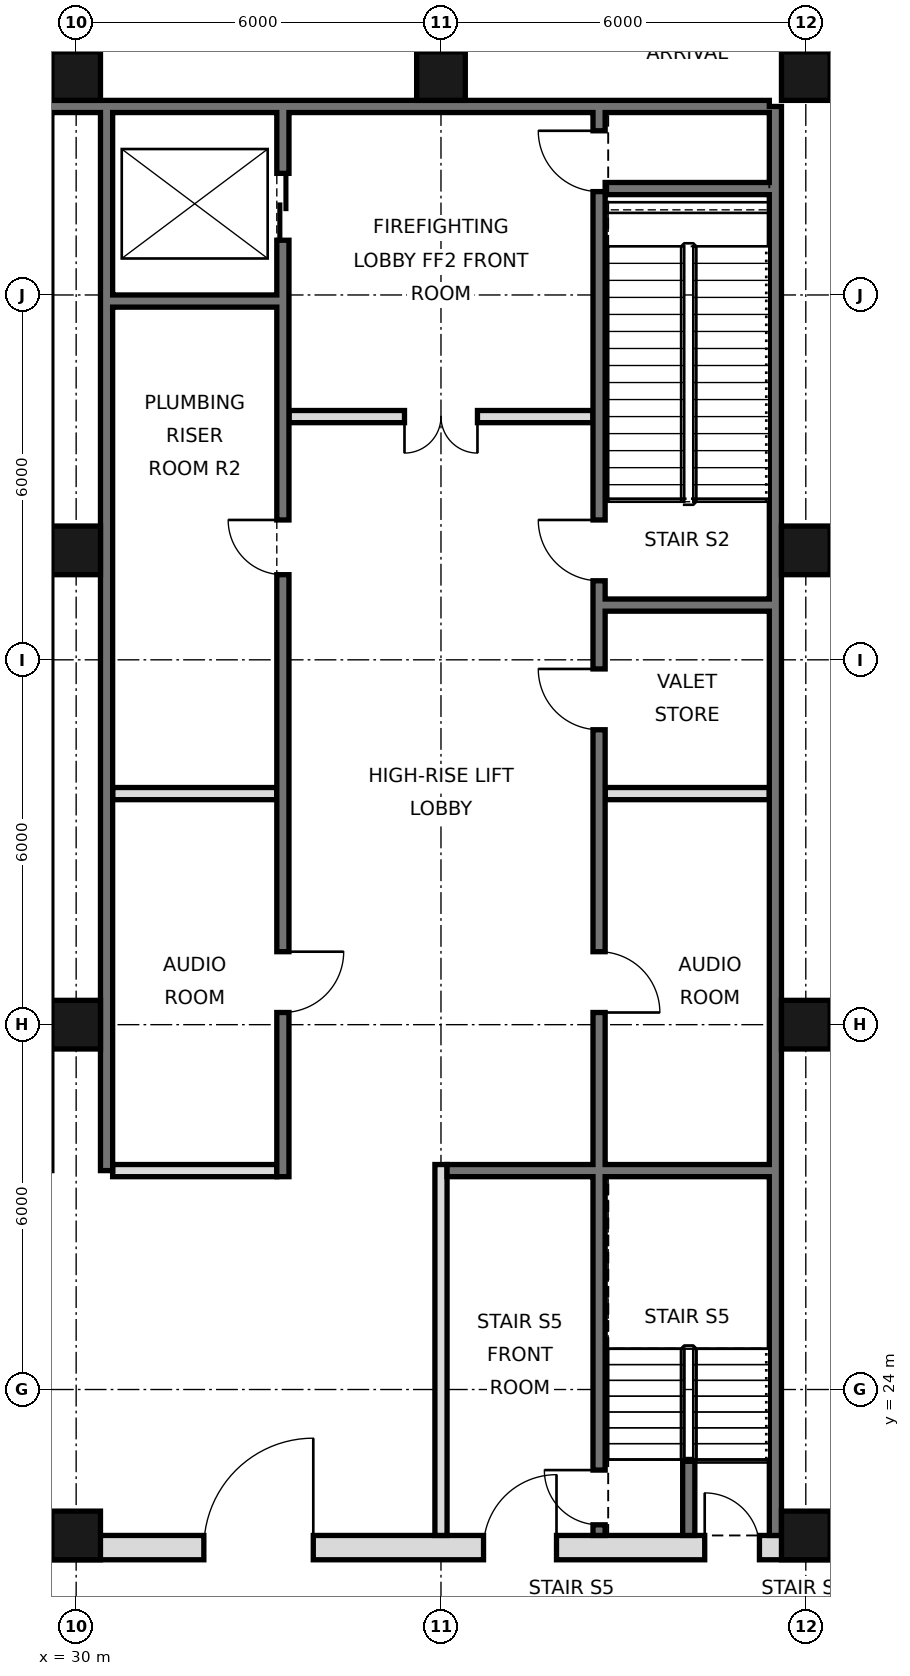
"""IFC4 building model, lengths in metres.
Left out: names, types, materials, properties, quantities, classifications, styles, units other than length and angle.
Written with IfcOpenShell. Run it as: python <this file> out.ifc"""

import sys

from ifc_helpers import new_model, si_unit, direction, frame, frame_2d, origin, origin_2d, place, context, subcontext, project, spatial, rectangle, hollow_rectangle, extrude, element, fill, save


model = new_model("IFC4")
c1 = context("Model", 3, precision=1e-05, world=origin(), true_north=direction((0.0, 1.0)))
c2 = subcontext(c1, "Body", "Model", "MODEL_VIEW")
j1 = project(units=[si_unit("LENGTHUNIT", "METRE"), si_unit("PLANEANGLEUNIT", "RADIAN")], contexts=[c1])
p1 = place(None, origin())
s1 = spatial("IfcSite", under=j1, at=p1, CompositionType="ELEMENT")
p2 = place(p1, origin())
s2 = spatial("IfcBuilding", under=s1, at=p2, CompositionType="ELEMENT")
p3 = place(p2, frame((0.0, 0.0, 138.4)))
s3 = spatial("IfcBuildingStorey", under=s2, at=p3, CompositionType="ELEMENT", Elevation=138.4)
for number, where, z_axis, x_axis in (
    (1, (30.0, 21.6, 0.0), (0.0, 0.0, 1.0), (1.0, 0.0, 0.0)),
    (2, (30.0, 30.0, 0.0), (0.0, 0.0, 1.0), (1.0, 0.0, 0.0)),
    (3, (30.0, 37.8, 0.0), (0.0, 0.0, 1.0), (1.0, 0.0, 0.0)),
    (4, (30.0, 45.6, 0.0), (0.0, 0.0, 1.0), (1.0, 0.0, 0.0)),
    (5, (36.0, 45.6, 0.0), (0.0, 0.0, 1.0), (1.0, 0.0, 0.0)),
    (6, (42.0, 21.6, 0.0), (0.0, 0.0, 1.0), (1.0, 0.0, 0.0)),
    (7, (42.0, 30.0, 0.0), (0.0, 0.0, 1.0), (1.0, 0.0, 0.0)),
    (8, (42.0, 37.8, 0.0), (0.0, 0.0, 1.0), (1.0, 0.0, 0.0)),
    (9, (42.0, 45.6, 0.0), (0.0, 0.0, 1.0), (1.0, 0.0, 0.0)),
):
    element("IfcColumn", number, at=place(p3, frame(where, z_axis=z_axis, x_axis=x_axis)), inside=s3, PredefinedType="COLUMN", context=c2, shape_type="SweptSolid", body=[
        extrude(hollow_rectangle(XDim=0.8, YDim=0.8, WallThickness=0.05, at=origin_2d()), origin(), (0.0, 0.0, 1.0), 5.4),
    ])
p4 = place(p3, frame((41.5, 21.6, 0.0), z_axis=(0.0, 0.0, 1.0), x_axis=(0.0, 1.0, 0.0)))
e10 = element("IfcWall", 10, at=p4, inside=s3, PredefinedType="SOLIDWALL", context=c2, shape_type="SweptSolid", body=[
    extrude(rectangle(XDim=23.5, YDim=0.2, at=frame_2d((11.75, 0.0))), origin(), (0.0, 0.0, 1.0), 5.22),
])
p5 = place(p3, frame((6.6, 45.1, 0.0), z_axis=(0.0, 0.0, 1.0), x_axis=(1.0, 0.0, 0.0)))
e11 = element("IfcWall", 11, at=p5, inside=s3, PredefinedType="SOLIDWALL", context=c2, shape_type="SweptSolid", body=[
    extrude(rectangle(XDim=34.8, YDim=0.2, at=frame_2d((17.4, 0.0))), origin(), (0.0, 0.0, 1.0), 5.22),
])
p6 = place(p3, frame((30.5, 27.6, 0.0), z_axis=(0.0, 0.0, 1.0), x_axis=(0.0, 1.0, 0.0)))
e12 = element("IfcWall", 12, at=p6, inside=s3, PredefinedType="SOLIDWALL", context=c2, shape_type="SweptSolid", body=[
    extrude(rectangle(XDim=17.5, YDim=0.2, at=frame_2d((8.75, 0.0))), origin(), (0.0, 0.0, 1.0), 5.22),
])
p7 = place(p3, frame((5.6, 21.4, 0.0), z_axis=(0.0, 0.0, 1.0), x_axis=(1.0, 0.0, 0.0)))
e13 = element("IfcWall", 13, at=p7, inside=s3, PredefinedType="SOLIDWALL", context=c2, shape_type="SweptSolid", body=[
    extrude(rectangle(XDim=36.8, YDim=0.4, at=frame_2d((18.4, 0.0))), origin(), (0.0, 0.0, 1.0), 5.22),
])
p8 = place(p7, frame((8.5, 0.0, 0.0)))
e14 = element("IfcOpeningElement", 14, at=p8, cuts=e13, PredefinedType="OPENING", context=c2, shape_type="SweptSolid", body=[
    extrude(rectangle(XDim=1.8, YDim=2.1, at=frame_2d((0.9, 1.05))), frame((0.0, 0.21, 0.0), z_axis=(0.0, -1.0, 0.0), x_axis=(1.0, 0.0, 0.0)), (0.0, 0.0, 1.0), 0.42),
])
p9 = place(p7, frame((17.5, 0.0, 0.0)))
e15 = element("IfcOpeningElement", 15, at=p9, cuts=e13, PredefinedType="OPENING", context=c2, shape_type="SweptSolid", body=[
    extrude(rectangle(XDim=1.8, YDim=2.1, at=frame_2d((0.9, 1.05))), frame((0.0, 0.21, 0.0), z_axis=(0.0, -1.0, 0.0), x_axis=(1.0, 0.0, 0.0)), (0.0, 0.0, 1.0), 0.42),
])
p10 = place(p7, frame((26.5, 0.0, 0.0)))
e16 = element("IfcOpeningElement", 16, at=p10, cuts=e13, PredefinedType="OPENING", context=c2, shape_type="SweptSolid", body=[
    extrude(rectangle(XDim=1.8, YDim=2.1, at=frame_2d((0.9, 1.05))), frame((0.0, 0.21, 0.0), z_axis=(0.0, -1.0, 0.0), x_axis=(1.0, 0.0, 0.0)), (0.0, 0.0, 1.0), 0.42),
])
p11 = place(p7, frame((4.5, 0.0, 0.0)))
e17 = element("IfcOpeningElement", 17, at=p11, cuts=e13, PredefinedType="OPENING", context=c2, shape_type="SweptSolid", body=[
    extrude(rectangle(XDim=1.2, YDim=2.1, at=frame_2d((0.6, 1.05))), frame((0.0, 0.21, 0.0), z_axis=(0.0, -1.0, 0.0), x_axis=(1.0, 0.0, 0.0)), (0.0, 0.0, 1.0), 0.42),
])
p12 = place(p7, frame((31.1, 0.0, 0.0)))
e18 = element("IfcOpeningElement", 18, at=p12, cuts=e13, PredefinedType="OPENING", context=c2, shape_type="SweptSolid", body=[
    extrude(rectangle(XDim=1.2, YDim=2.1, at=frame_2d((0.6, 1.05))), frame((0.0, 0.21, 0.0), z_axis=(0.0, -1.0, 0.0), x_axis=(1.0, 0.0, 0.0)), (0.0, 0.0, 1.0), 0.42),
])
p13 = place(p7, frame((1.163, 0.0, 0.0)))
e19 = element("IfcOpeningElement", 19, at=p13, cuts=e13, PredefinedType="OPENING", context=c2, shape_type="SweptSolid", body=[
    extrude(rectangle(XDim=0.9, YDim=2.1, at=frame_2d((0.45, 1.05))), frame((0.0, 0.21, 0.0), z_axis=(0.0, -1.0, 0.0), x_axis=(1.0, 0.0, 0.0)), (0.0, 0.0, 1.0), 0.42),
])
p14 = place(p7, frame((34.738, 0.0, 0.0)))
e20 = element("IfcOpeningElement", 20, at=p14, cuts=e13, PredefinedType="OPENING", context=c2, shape_type="SweptSolid", body=[
    extrude(rectangle(XDim=0.9, YDim=2.1, at=frame_2d((0.45, 1.05))), frame((0.0, 0.21, 0.0), z_axis=(0.0, -1.0, 0.0), x_axis=(1.0, 0.0, 0.0)), (0.0, 0.0, 1.0), 0.42),
])
p15 = place(p3, frame((33.4, 27.5, 0.0), z_axis=(0.0, 0.0, 1.0), x_axis=(0.0, 1.0, 0.0)))
e21 = element("IfcWall", 21, at=p15, inside=s3, PredefinedType="SOLIDWALL", context=c2, shape_type="SweptSolid", body=[
    extrude(rectangle(XDim=17.5, YDim=0.2, at=frame_2d((8.75, 0.0))), origin(), (0.0, 0.0, 1.0), 5.22),
])
p16 = place(p15, frame((15.4, 0.0, 0.0)))
e22 = element("IfcOpeningElement", 22, at=p16, cuts=e21, PredefinedType="OPENING", context=c2, shape_type="SweptSolid", body=[
    extrude(rectangle(XDim=1.1, YDim=2.1, at=frame_2d((0.55, 1.05))), frame((0.0, 0.11, 0.0), z_axis=(0.0, -1.0, 0.0), x_axis=(1.0, 0.0, 0.0)), (0.0, 0.0, 1.0), 0.22),
])
p17 = place(p15, frame((2.7, 0.0, 0.0)))
e23 = element("IfcOpeningElement", 23, at=p17, cuts=e21, PredefinedType="OPENING", context=c2, shape_type="SweptSolid", body=[
    extrude(rectangle(XDim=1.0, YDim=2.1, at=frame_2d((0.5, 1.05))), frame((0.0, 0.11, 0.0), z_axis=(0.0, -1.0, 0.0), x_axis=(1.0, 0.0, 0.0)), (0.0, 0.0, 1.0), 0.22),
])
p18 = place(p15, frame((9.9, 0.0, 0.0)))
e24 = element("IfcOpeningElement", 24, at=p18, cuts=e21, PredefinedType="OPENING", context=c2, shape_type="SweptSolid", body=[
    extrude(rectangle(XDim=0.9, YDim=2.1, at=frame_2d((0.45, 1.05))), frame((0.0, 0.11, 0.0), z_axis=(0.0, -1.0, 0.0), x_axis=(1.0, 0.0, 0.0)), (0.0, 0.0, 1.0), 0.22),
])
p19 = place(p3, frame((36.0, 21.6, 0.0), z_axis=(0.0, 0.0, 1.0), x_axis=(0.0, 1.0, 0.0)))
e25 = element("IfcWall", 25, at=p19, inside=s3, PredefinedType="PARTITIONING", context=c2, shape_type="SweptSolid", body=[
    extrude(rectangle(XDim=6.1, YDim=0.2, at=frame_2d((3.05, 0.0))), origin(), (0.0, 0.0, 1.0), 5.22),
])
p20 = place(p3, frame((38.6, 21.6, 0.0), z_axis=(0.0, 0.0, 1.0), x_axis=(0.0, 1.0, 0.0)))
e26 = element("IfcWall", 26, at=p20, inside=s3, PredefinedType="SOLIDWALL", context=c2, shape_type="SweptSolid", body=[
    extrude(rectangle(XDim=23.4, YDim=0.2, at=frame_2d((11.7, 0.0))), origin(), (0.0, 0.0, 1.0), 5.22),
])
p21 = place(p20, frame((8.6, 0.0, 0.0)))
e27 = element("IfcOpeningElement", 27, at=p21, cuts=e26, PredefinedType="OPENING", context=c2, shape_type="SweptSolid", body=[
    extrude(rectangle(XDim=1.0, YDim=2.1, at=frame_2d((0.5, 1.05))), frame((0.0, 0.11, 0.0), z_axis=(0.0, -1.0, 0.0), x_axis=(1.0, 0.0, 0.0)), (0.0, 0.0, 1.0), 0.22),
])
p22 = place(p20, frame((13.25, 0.0, 0.0)))
e28 = element("IfcOpeningElement", 28, at=p22, cuts=e26, PredefinedType="OPENING", context=c2, shape_type="SweptSolid", body=[
    extrude(rectangle(XDim=1.0, YDim=2.1, at=frame_2d((0.5, 1.05))), frame((0.0, 0.11, 0.0), z_axis=(0.0, -1.0, 0.0), x_axis=(1.0, 0.0, 0.0)), (0.0, 0.0, 1.0), 0.22),
])
p23 = place(p20, frame((22.1, 0.0, 0.0)))
e29 = element("IfcOpeningElement", 29, at=p23, cuts=e26, PredefinedType="OPENING", context=c2, shape_type="SweptSolid", body=[
    extrude(rectangle(XDim=1.0, YDim=2.1, at=frame_2d((0.5, 1.05))), frame((0.0, 0.11, 0.0), z_axis=(0.0, -1.0, 0.0), x_axis=(1.0, 0.0, 0.0)), (0.0, 0.0, 1.0), 0.22),
])
p24 = place(p20, frame((15.7, 0.0, 0.0)))
e30 = element("IfcOpeningElement", 30, at=p24, cuts=e26, PredefinedType="OPENING", context=c2, shape_type="SweptSolid", body=[
    extrude(rectangle(XDim=1.0, YDim=2.1, at=frame_2d((0.5, 1.05))), frame((0.0, 0.11, 0.0), z_axis=(0.0, -1.0, 0.0), x_axis=(1.0, 0.0, 0.0)), (0.0, 0.0, 1.0), 0.22),
])
p25 = place(p20, frame((0.175, 0.0, 0.0)))
e31 = element("IfcOpeningElement", 31, at=p25, cuts=e26, PredefinedType="OPENING", context=c2, shape_type="SweptSolid", body=[
    extrude(rectangle(XDim=0.9, YDim=2.1, at=frame_2d((0.45, 1.05))), frame((0.0, 0.11, 0.0), z_axis=(0.0, -1.0, 0.0), x_axis=(1.0, 0.0, 0.0)), (0.0, 0.0, 1.0), 0.22),
])
p26 = place(p3, frame((40.075, 21.6, 0.0), z_axis=(0.0, 0.0, 1.0), x_axis=(0.0, 1.0, 0.0)))
e32 = element("IfcWall", 32, at=p26, inside=s3, PredefinedType="SOLIDWALL", context=c2, shape_type="SweptSolid", body=[
    extrude(rectangle(XDim=1.25, YDim=0.2, at=frame_2d((0.625, 0.0))), origin(), (0.0, 0.0, 1.0), 5.22),
])
p27 = place(p3, frame((30.6, 27.6, 0.0), z_axis=(0.0, 0.0, 1.0), x_axis=(1.0, 0.0, 0.0)))
e33 = element("IfcWall", 33, at=p27, inside=s3, PredefinedType="PARTITIONING", context=c2, shape_type="SweptSolid", body=[
    extrude(rectangle(XDim=2.7, YDim=0.2, at=frame_2d((1.35, 0.0))), origin(), (0.0, 0.0, 1.0), 5.22),
])
p28 = place(p3, frame((36.1, 27.6, 0.0), z_axis=(0.0, 0.0, 1.0), x_axis=(1.0, 0.0, 0.0)))
e34 = element("IfcWall", 34, at=p28, inside=s3, PredefinedType="SOLIDWALL", context=c2, shape_type="SweptSolid", body=[
    extrude(rectangle(XDim=5.3, YDim=0.2, at=frame_2d((2.65, 0.0))), origin(), (0.0, 0.0, 1.0), 5.22),
])
p29 = place(p3, frame((30.6, 33.8, 0.0), z_axis=(0.0, 0.0, 1.0), x_axis=(1.0, 0.0, 0.0)))
e35 = element("IfcWall", 35, at=p29, inside=s3, PredefinedType="SOLIDWALL", context=c2, shape_type="SweptSolid", body=[
    extrude(rectangle(XDim=2.7, YDim=0.2, at=frame_2d((1.35, 0.0))), origin(), (0.0, 0.0, 1.0), 5.22),
])
p30 = place(p3, frame((38.7, 33.8, 0.0), z_axis=(0.0, 0.0, 1.0), x_axis=(1.0, 0.0, 0.0)))
e36 = element("IfcWall", 36, at=p30, inside=s3, PredefinedType="PARTITIONING", context=c2, shape_type="SweptSolid", body=[
    extrude(rectangle(XDim=2.7, YDim=0.2, at=frame_2d((1.35, 0.0))), origin(), (0.0, 0.0, 1.0), 5.22),
])
p31 = place(p3, frame((38.7, 36.9, 0.0), z_axis=(0.0, 0.0, 1.0), x_axis=(1.0, 0.0, 0.0)))
e37 = element("IfcWall", 37, at=p31, inside=s3, PredefinedType="SOLIDWALL", context=c2, shape_type="SweptSolid", body=[
    extrude(rectangle(XDim=2.7, YDim=0.2, at=frame_2d((1.35, 0.0))), origin(), (0.0, 0.0, 1.0), 5.22),
])
p32 = place(p3, frame((33.5, 40.0, 0.0), z_axis=(0.0, 0.0, 1.0), x_axis=(1.0, 0.0, 0.0)))
e38 = element("IfcWall", 38, at=p32, inside=s3, PredefinedType="PARTITIONING", context=c2, shape_type="SweptSolid", body=[
    extrude(rectangle(XDim=5.0, YDim=0.2, at=frame_2d((2.5, 0.0))), origin(), (0.0, 0.0, 1.0), 5.22),
])
p33 = place(p32, frame((1.9, 0.0, 0.0)))
e39 = element("IfcOpeningElement", 39, at=p33, cuts=e38, PredefinedType="OPENING", context=c2, shape_type="SweptSolid", body=[
    extrude(rectangle(XDim=1.2, YDim=2.1, at=frame_2d((0.6, 1.05))), frame((0.0, 0.11, 0.0), z_axis=(0.0, -1.0, 0.0), x_axis=(1.0, 0.0, 0.0)), (0.0, 0.0, 1.0), 0.22),
])
p34 = place(p3, frame((30.6, 41.9, 0.0), z_axis=(0.0, 0.0, 1.0), x_axis=(1.0, 0.0, 0.0)))
e40 = element("IfcWall", 40, at=p34, inside=s3, PredefinedType="SOLIDWALL", context=c2, shape_type="SweptSolid", body=[
    extrude(rectangle(XDim=2.7, YDim=0.2, at=frame_2d((1.35, 0.0))), origin(), (0.0, 0.0, 1.0), 5.22),
])
p35 = place(p3, frame((38.7, 43.75, 0.0), z_axis=(0.0, 0.0, 1.0), x_axis=(1.0, 0.0, 0.0)))
e41 = element("IfcWall", 41, at=p35, inside=s3, PredefinedType="SOLIDWALL", context=c2, shape_type="SweptSolid", body=[
    extrude(rectangle(XDim=2.7, YDim=0.2, at=frame_2d((1.35, 0.0))), origin(), (0.0, 0.0, 1.0), 2.5),
])
p36 = place(p10, frame((1.8, 0.0, 0.0), z_axis=(0.0, 0.0, 1.0), x_axis=(-1.0, 0.0, 0.0)))
e42 = element("IfcDoor", 42, at=p36, inside=s3, OperationType="SINGLE_SWING_LEFT", PredefinedType="DOOR", context=c2, shape_type="SweptSolid", body=[
    extrude(rectangle(XDim=1.8, YDim=2.1, at=frame_2d((0.9, 1.05))), frame((0.0, 0.025, 0.0), z_axis=(0.0, -1.0, 0.0), x_axis=(1.0, 0.0, 0.0)), (0.0, 0.0, 1.0), 0.05),
])
fill(e16, e42)
p37 = place(p12, frame((1.2, 0.0, 0.0), z_axis=(0.0, 0.0, 1.0), x_axis=(-1.0, 0.0, 0.0)))
e43 = element("IfcDoor", 43, at=p37, inside=s3, OperationType="SINGLE_SWING_LEFT", PredefinedType="DOOR", context=c2, shape_type="SweptSolid", body=[
    extrude(rectangle(XDim=1.2, YDim=2.1, at=frame_2d((0.6, 1.05))), frame((0.0, 0.025, 0.0), z_axis=(0.0, -1.0, 0.0), x_axis=(1.0, 0.0, 0.0)), (0.0, 0.0, 1.0), 0.05),
])
fill(e18, e43)
p38 = place(p33, frame((1.2, 0.0, 0.0), z_axis=(0.0, 0.0, 1.0), x_axis=(-1.0, 0.0, 0.0)))
e44 = element("IfcDoor", 44, at=p38, inside=s3, OperationType="DOUBLE_DOOR_SINGLE_SWING", PredefinedType="DOOR", context=c2, shape_type="SweptSolid", body=[
    extrude(rectangle(XDim=1.2, YDim=2.1, at=frame_2d((0.6, 1.05))), frame((0.0, 0.025, 0.0), z_axis=(0.0, -1.0, 0.0), x_axis=(1.0, 0.0, 0.0)), (0.0, 0.0, 1.0), 0.05),
])
fill(e39, e44)
p39 = place(p16, origin())
e45 = element("IfcDoor", 45, at=p39, inside=s3, OperationType="DOUBLE_DOOR_SLIDING", PredefinedType="DOOR", context=c2, shape_type="SweptSolid", body=[
    extrude(rectangle(XDim=1.1, YDim=2.1, at=frame_2d((0.55, 1.05))), frame((0.0, 0.025, 0.0), z_axis=(0.0, -1.0, 0.0), x_axis=(1.0, 0.0, 0.0)), (0.0, 0.0, 1.0), 0.05),
])
fill(e22, e45)
p40 = place(p21, frame((1.0, 0.0, 0.0), z_axis=(0.0, 0.0, 1.0), x_axis=(-1.0, 0.0, 0.0)))
e46 = element("IfcDoor", 46, at=p40, inside=s3, OperationType="SINGLE_SWING_RIGHT", PredefinedType="DOOR", context=c2, shape_type="SweptSolid", body=[
    extrude(rectangle(XDim=1.0, YDim=2.1, at=frame_2d((0.5, 1.05))), frame((0.0, 0.025, 0.0), z_axis=(0.0, -1.0, 0.0), x_axis=(1.0, 0.0, 0.0)), (0.0, 0.0, 1.0), 0.05),
])
fill(e27, e46)
p41 = place(p22, frame((1.0, 0.0, 0.0), z_axis=(0.0, 0.0, 1.0), x_axis=(-1.0, 0.0, 0.0)))
e47 = element("IfcDoor", 47, at=p41, inside=s3, OperationType="SINGLE_SWING_LEFT", PredefinedType="DOOR", context=c2, shape_type="SweptSolid", body=[
    extrude(rectangle(XDim=1.0, YDim=2.1, at=frame_2d((0.5, 1.05))), frame((0.0, 0.025, 0.0), z_axis=(0.0, -1.0, 0.0), x_axis=(1.0, 0.0, 0.0)), (0.0, 0.0, 1.0), 0.05),
])
fill(e28, e47)
p42 = place(p17, origin())
e48 = element("IfcDoor", 48, at=p42, inside=s3, OperationType="SINGLE_SWING_RIGHT", PredefinedType="DOOR", context=c2, shape_type="SweptSolid", body=[
    extrude(rectangle(XDim=1.0, YDim=2.1, at=frame_2d((0.5, 1.05))), frame((0.0, 0.025, 0.0), z_axis=(0.0, -1.0, 0.0), x_axis=(1.0, 0.0, 0.0)), (0.0, 0.0, 1.0), 0.05),
])
fill(e23, e48)
p43 = place(p23, frame((1.0, 0.0, 0.0), z_axis=(0.0, 0.0, 1.0), x_axis=(-1.0, 0.0, 0.0)))
e49 = element("IfcDoor", 49, at=p43, inside=s3, OperationType="SINGLE_SWING_LEFT", PredefinedType="DOOR", context=c2, shape_type="SweptSolid", body=[
    extrude(rectangle(XDim=1.0, YDim=2.1, at=frame_2d((0.5, 1.05))), frame((0.0, 0.025, 0.0), z_axis=(0.0, -1.0, 0.0), x_axis=(1.0, 0.0, 0.0)), (0.0, 0.0, 1.0), 0.05),
])
fill(e29, e49)
p44 = place(p24, frame((1.0, 0.0, 0.0), z_axis=(0.0, 0.0, 1.0), x_axis=(-1.0, 0.0, 0.0)))
e50 = element("IfcDoor", 50, at=p44, inside=s3, OperationType="SINGLE_SWING_LEFT", PredefinedType="DOOR", context=c2, shape_type="SweptSolid", body=[
    extrude(rectangle(XDim=1.0, YDim=2.1, at=frame_2d((0.5, 1.05))), frame((0.0, 0.025, 0.0), z_axis=(0.0, -1.0, 0.0), x_axis=(1.0, 0.0, 0.0)), (0.0, 0.0, 1.0), 0.05),
])
fill(e30, e50)
p45 = place(p25, frame((0.9, 0.0, 0.0), z_axis=(0.0, 0.0, 1.0), x_axis=(-1.0, 0.0, 0.0)))
e51 = element("IfcDoor", 51, at=p45, inside=s3, OperationType="SINGLE_SWING_LEFT", PredefinedType="DOOR", context=c2, shape_type="SweptSolid", body=[
    extrude(rectangle(XDim=0.9, YDim=2.1, at=frame_2d((0.45, 1.05))), frame((0.0, 0.025, 0.0), z_axis=(0.0, -1.0, 0.0), x_axis=(1.0, 0.0, 0.0)), (0.0, 0.0, 1.0), 0.05),
])
fill(e31, e51)
p46 = place(p14, origin())
e52 = element("IfcDoor", 52, at=p46, inside=s3, OperationType="SINGLE_SWING_LEFT", PredefinedType="DOOR", context=c2, shape_type="SweptSolid", body=[
    extrude(rectangle(XDim=0.9, YDim=2.1, at=frame_2d((0.45, 1.05))), frame((0.0, 0.025, 0.0), z_axis=(0.0, -1.0, 0.0), x_axis=(1.0, 0.0, 0.0)), (0.0, 0.0, 1.0), 0.05),
])
fill(e20, e52)
p47 = place(p18, frame((0.9, 0.0, 0.0), z_axis=(0.0, 0.0, 1.0), x_axis=(-1.0, 0.0, 0.0)))
e53 = element("IfcDoor", 53, at=p47, inside=s3, OperationType="SINGLE_SWING_LEFT", PredefinedType="DOOR", context=c2, shape_type="SweptSolid", body=[
    extrude(rectangle(XDim=0.9, YDim=2.1, at=frame_2d((0.45, 1.05))), frame((0.0, 0.025, 0.0), z_axis=(0.0, -1.0, 0.0), x_axis=(1.0, 0.0, 0.0)), (0.0, 0.0, 1.0), 0.05),
])
fill(e24, e53)
save(model, sys.argv[1])
